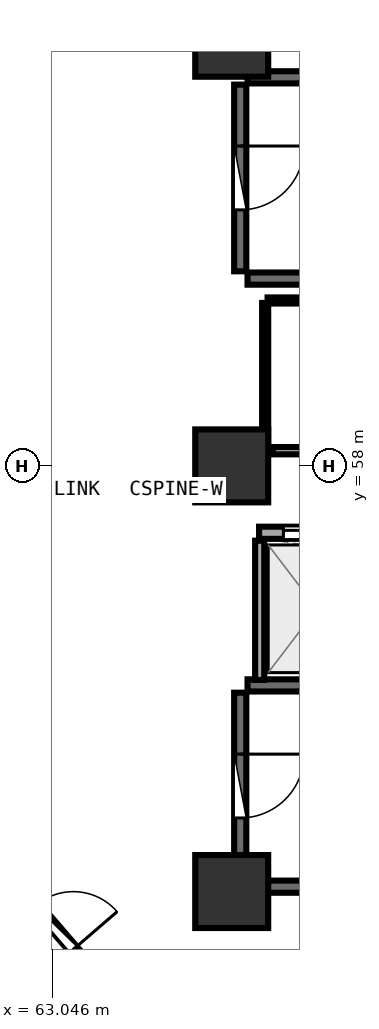
"""IFC4 building model, lengths in metres.
Left out: names, types, materials, properties, quantities, classifications, styles, units other than length and angle.
Written with IfcOpenShell. Run it as: python <this file> out.ifc"""

import sys

from ifc_helpers import new_model, si_unit, direction, frame, frame_2d, origin, origin_2d, place, context, subcontext, project, spatial, rectangle, extrude, element, fill, save


model = new_model("IFC4")
c1 = context("Model", 3, precision=1e-05, world=origin(), true_north=direction((0.0, 1.0)))
c2 = subcontext(c1, "Body", "Model", "MODEL_VIEW")
j1 = project(units=[si_unit("LENGTHUNIT", "METRE"), si_unit("PLANEANGLEUNIT", "RADIAN")], contexts=[c1])
p1 = place(None, origin())
s1 = spatial("IfcSite", under=j1, at=p1, CompositionType="ELEMENT")
p2 = place(p1, origin())
s2 = spatial("IfcBuilding", under=s1, at=p2, CompositionType="ELEMENT")
p3 = place(p2, frame((0.0, 0.0, 176.85)))
s3 = spatial("IfcBuildingStorey", under=s2, at=p3, CompositionType="ELEMENT", Elevation=176.85)
for number, where, z_axis, x_axis in (
    (1, (66.0, 51.0, 0.0), (0.0, 0.0, 1.0), (1.0, 0.0, 0.0)),
    (2, (66.0, 65.0, 0.0), (0.0, 0.0, 1.0), (1.0, 0.0, 0.0)),
    (3, (66.0, 58.0, 0.0), (0.0, 0.0, 1.0), (1.0, 0.0, 0.0)),
):
    element("IfcColumn", number, at=place(p3, frame(where, z_axis=z_axis, x_axis=x_axis)), inside=s3, PredefinedType="PILASTER", context=c2, shape_type="SweptSolid", body=[
        extrude(rectangle(XDim=1.2, YDim=1.2, at=origin_2d()), origin(), (0.0, 0.0, 1.0), 3.75),
    ])
for number, where, z_axis, x_axis in (
    (4, (66.26, 61.08, 0.0), (0.0, 0.0, 1.0), (1.0, 0.0, 0.0)),
    (5, (73.42, 64.39, 0.0), (0.0, 0.0, 1.0), (-1.0, 0.0, 0.0)),
):
    element("IfcWall", number, at=place(p3, frame(where, z_axis=z_axis, x_axis=x_axis)), inside=s3, PredefinedType="SHEAR", context=c2, shape_type="SweptSolid", body=[
        extrude(rectangle(XDim=7.16, YDim=0.2, at=frame_2d((3.58, 0.0))), origin(), (0.0, 0.0, 1.0), 3.49),
    ])
p4 = place(p3, frame((66.14, 64.27, 0.0), z_axis=(0.0, 0.0, 1.0), x_axis=(0.0, -1.0, 0.0)))
e6 = element("IfcWall", 6, at=p4, inside=s3, PredefinedType="SHEAR", context=c2, shape_type="SweptSolid", body=[
    extrude(rectangle(XDim=3.07, YDim=0.2, at=frame_2d((1.535, 0.0))), origin(), (0.0, 0.0, 1.0), 3.49),
])
p5 = place(p4, frame((1.01, 0.0, 0.0)))
e7 = element("IfcOpeningElement", 7, at=p5, cuts=e6, PredefinedType="OPENING", context=c2, shape_type="SweptSolid", body=[
    extrude(rectangle(XDim=1.05, YDim=2.1, at=frame_2d((0.525, 1.05))), frame((0.0, 0.11, 0.0), z_axis=(0.0, -1.0, 0.0), x_axis=(1.0, 0.0, 0.0)), (0.0, 0.0, 1.0), 0.22),
])
for number, where, z_axis, x_axis in (
    (8, (66.26, 51.08, 0.0), (0.0, 0.0, 1.0), (1.0, 0.0, 0.0)),
    (9, (73.42, 54.39, 0.0), (0.0, 0.0, 1.0), (-1.0, 0.0, 0.0)),
):
    element("IfcWall", number, at=place(p3, frame(where, z_axis=z_axis, x_axis=x_axis)), inside=s3, PredefinedType="SHEAR", context=c2, shape_type="SweptSolid", body=[
        extrude(rectangle(XDim=7.16, YDim=0.2, at=frame_2d((3.58, 0.0))), origin(), (0.0, 0.0, 1.0), 3.49),
    ])
p6 = place(p3, frame((66.14, 54.27, 0.0), z_axis=(0.0, 0.0, 1.0), x_axis=(0.0, -1.0, 0.0)))
e10 = element("IfcWall", 10, at=p6, inside=s3, PredefinedType="SHEAR", context=c2, shape_type="SweptSolid", body=[
    extrude(rectangle(XDim=3.07, YDim=0.2, at=frame_2d((1.535, 0.0))), origin(), (0.0, 0.0, 1.0), 3.49),
])
p7 = place(p6, frame((1.01, 0.0, 0.0)))
e11 = element("IfcOpeningElement", 11, at=p7, cuts=e10, PredefinedType="OPENING", context=c2, shape_type="SweptSolid", body=[
    extrude(rectangle(XDim=1.05, YDim=2.1, at=frame_2d((0.525, 1.05))), frame((0.0, 0.11, 0.0), z_axis=(0.0, -1.0, 0.0), x_axis=(1.0, 0.0, 0.0)), (0.0, 0.0, 1.0), 0.22),
])
p8 = place(p3, frame((66.45, 56.9, 0.0), z_axis=(0.0, 0.0, 1.0), x_axis=(1.0, 0.0, 0.0)))
e12 = element("IfcWall", 12, at=p8, inside=s3, PredefinedType="SOLIDWALL", context=c2, shape_type="SweptSolid", body=[
    extrude(rectangle(XDim=14.4, YDim=0.2, at=frame_2d((7.2, 0.0))), origin(), (0.0, 0.0, 1.0), 3.48),
])
p9 = place(p8, frame((0.4, 0.0, 0.0)))
e13 = element("IfcOpeningElement", 13, at=p9, cuts=e12, PredefinedType="OPENING", context=c2, shape_type="SweptSolid", body=[
    extrude(rectangle(XDim=1.1, YDim=2.1, at=frame_2d((0.55, 1.05))), frame((0.0, 0.11, 0.0), z_axis=(0.0, -1.0, 0.0), x_axis=(1.0, 0.0, 0.0)), (0.0, 0.0, 1.0), 0.22),
])
p10 = place(p8, frame((2.4, 0.0, 0.0)))
e14 = element("IfcOpeningElement", 14, at=p10, cuts=e12, PredefinedType="OPENING", context=c2, shape_type="SweptSolid", body=[
    extrude(rectangle(XDim=1.1, YDim=2.1, at=frame_2d((0.55, 1.05))), frame((0.0, 0.11, 0.0), z_axis=(0.0, -1.0, 0.0), x_axis=(1.0, 0.0, 0.0)), (0.0, 0.0, 1.0), 0.22),
])
p11 = place(p8, frame((4.4, 0.0, 0.0)))
e15 = element("IfcOpeningElement", 15, at=p11, cuts=e12, PredefinedType="OPENING", context=c2, shape_type="SweptSolid", body=[
    extrude(rectangle(XDim=1.1, YDim=2.1, at=frame_2d((0.55, 1.05))), frame((0.0, 0.11, 0.0), z_axis=(0.0, -1.0, 0.0), x_axis=(1.0, 0.0, 0.0)), (0.0, 0.0, 1.0), 0.22),
])
p12 = place(p3, frame((66.46, 54.48, 0.0), z_axis=(0.0, 0.0, 1.0), x_axis=(0.0, 1.0, 0.0)))
e16 = element("IfcWall", 16, at=p12, inside=s3, PredefinedType="PARTITIONING", context=c2, shape_type="SweptSolid", body=[
    extrude(rectangle(XDim=2.29, YDim=0.15, at=frame_2d((1.145, 0.0))), origin(), (0.0, 0.0, 1.0), 3.48),
])
p13 = place(p3, frame((66.675, 58.25, 0.0), z_axis=(0.0, 0.0, 1.0), x_axis=(1.0, 0.0, 0.0)))
e17 = element("IfcWall", 17, at=p13, inside=s3, PredefinedType="PARTITIONING", context=c2, shape_type="SweptSolid", body=[
    extrude(rectangle(XDim=3.265, YDim=0.12, at=frame_2d((1.632, 0.0))), origin(), (0.0, 0.0, 1.0), 3.48),
])
p14 = place(p13, frame((1.182, 0.0, 0.0)))
e18 = element("IfcOpeningElement", 18, at=p14, cuts=e17, PredefinedType="OPENING", context=c2, shape_type="SweptSolid", body=[
    extrude(rectangle(XDim=0.9, YDim=2.08, at=frame_2d((0.45, 1.04))), frame((0.0, 0.07, 0.0), z_axis=(0.0, -1.0, 0.0), x_axis=(1.0, 0.0, 0.0)), (0.0, 0.0, 1.0), 0.14),
])
p15 = place(p3, frame((62.577, 50.999, 0.0), z_axis=(0.0, 0.0, 1.0), x_axis=(0.652725635782, -0.757594379859, 0.0)))
e19 = element("IfcWall", 19, at=p15, inside=s3, PredefinedType="PARTITIONING", context=c2, shape_type="SweptSolid", body=[
    extrude(rectangle(XDim=1.557, YDim=0.15, at=frame_2d((0.779, 0.0))), origin(), (0.0, 0.0, 1.0), 2.975),
])
p16 = place(p15, frame((0.304, 0.0, 0.0)))
e20 = element("IfcOpeningElement", 20, at=p16, cuts=e19, PredefinedType="OPENING", context=c2, shape_type="SweptSolid", body=[
    extrude(rectangle(XDim=0.95, YDim=2.08, at=frame_2d((0.475, 1.04))), frame((0.0, 0.085, 0.0), z_axis=(0.0, -1.0, 0.0), x_axis=(1.0, 0.0, 0.0)), (0.0, 0.0, 1.0), 0.17),
])
p17 = place(p3, frame((69.96, 60.72, 0.0), z_axis=(0.0, 0.0, 1.0), x_axis=(-1.0, 0.0, 0.0)))
e21 = element("IfcWall", 21, at=p17, inside=s3, PredefinedType="PARTITIONING", context=c2, shape_type="SweptSolid", body=[
    extrude(rectangle(XDim=3.37, YDim=0.1, at=frame_2d((1.685, 0.0))), origin(), (0.0, 0.0, 1.0), 3.48),
])
p18 = place(p3, frame((66.55, 60.68, 0.0), z_axis=(0.0, 0.0, 1.0), x_axis=(0.0, -1.0, 0.0)))
e22 = element("IfcWall", 22, at=p18, inside=s3, PredefinedType="PARTITIONING", context=c2, shape_type="SweptSolid", body=[
    extrude(rectangle(XDim=2.383, YDim=0.1, at=frame_2d((1.191, 0.0))), origin(), (0.0, 0.0, 1.0), 3.48),
])
p19 = place(p5, origin())
e23 = element("IfcDoor", 23, at=p19, inside=s3, OperationType="SINGLE_SWING_LEFT", PredefinedType="DOOR", context=c2, shape_type="SweptSolid", body=[
    extrude(rectangle(XDim=1.05, YDim=2.1, at=frame_2d((0.525, 1.05))), frame((0.0, 0.025, 0.0), z_axis=(0.0, -1.0, 0.0), x_axis=(1.0, 0.0, 0.0)), (0.0, 0.0, 1.0), 0.05),
])
fill(e7, e23)
p20 = place(p7, origin())
e24 = element("IfcDoor", 24, at=p20, inside=s3, OperationType="SINGLE_SWING_LEFT", PredefinedType="DOOR", context=c2, shape_type="SweptSolid", body=[
    extrude(rectangle(XDim=1.05, YDim=2.1, at=frame_2d((0.525, 1.05))), frame((0.0, 0.025, 0.0), z_axis=(0.0, -1.0, 0.0), x_axis=(1.0, 0.0, 0.0)), (0.0, 0.0, 1.0), 0.05),
])
fill(e11, e24)
p21 = place(p9, origin())
e25 = element("IfcDoor", 25, at=p21, inside=s3, OperationType="DOUBLE_DOOR_SLIDING", PredefinedType="DOOR", context=c2, shape_type="SweptSolid", body=[
    extrude(rectangle(XDim=1.1, YDim=2.1, at=frame_2d((0.55, 1.05))), frame((0.0, 0.025, 0.0), z_axis=(0.0, -1.0, 0.0), x_axis=(1.0, 0.0, 0.0)), (0.0, 0.0, 1.0), 0.05),
])
fill(e13, e25)
p22 = place(p16, origin())
e26 = element("IfcDoor", 26, at=p22, inside=s3, OperationType="SINGLE_SWING_RIGHT", PredefinedType="DOOR", context=c2, shape_type="SweptSolid", body=[
    extrude(rectangle(XDim=0.95, YDim=2.08, at=frame_2d((0.475, 1.04))), frame((0.0, 0.025, 0.0), z_axis=(0.0, -1.0, 0.0), x_axis=(1.0, 0.0, 0.0)), (0.0, 0.0, 1.0), 0.05),
])
fill(e20, e26)
save(model, sys.argv[1])
